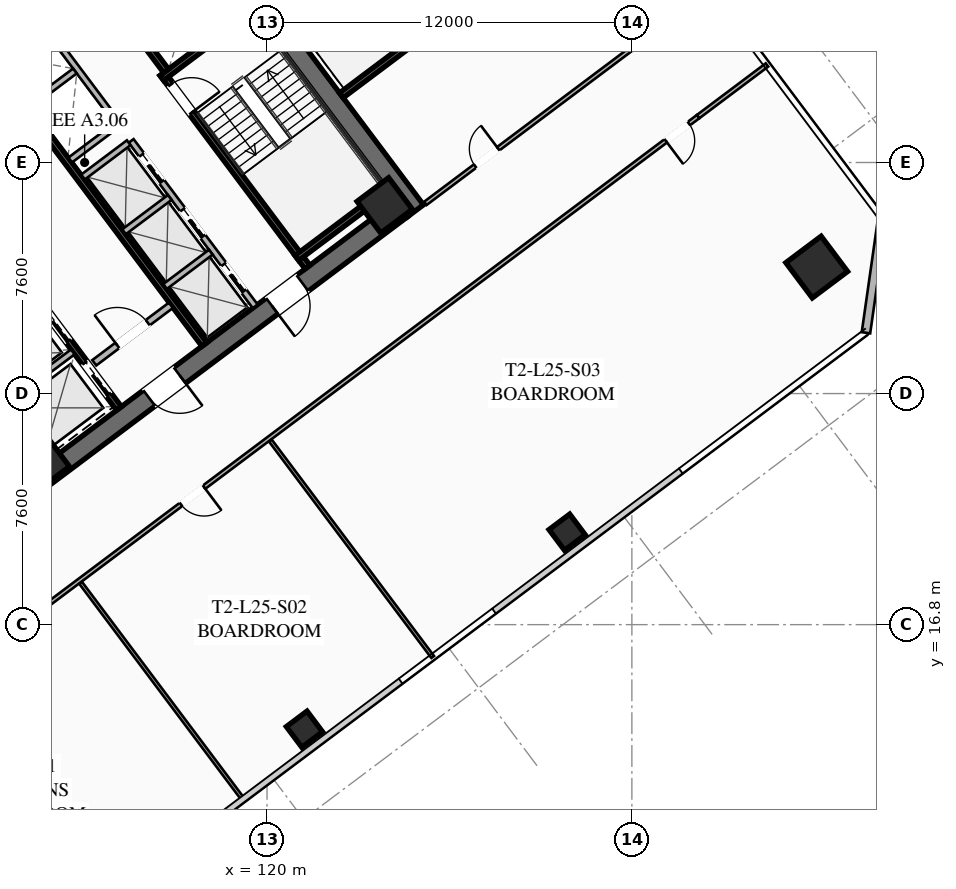
"""IFC4 building model, lengths in metres.
Left out: names, types, materials, properties, quantities, classifications, styles, units other than length and angle.
Written with IfcOpenShell. Run it as: python <this file> out.ifc"""

import sys

from ifc_helpers import new_model, si_unit, direction, frame, frame_2d, origin, origin_2d, place, context, subcontext, project, spatial, rectangle, hollow_rectangle, extrude, element, fill, save


model = new_model("IFC4")
c1 = context("Model", 3, precision=1e-05, world=origin(), true_north=direction((0.0, 1.0)))
c2 = subcontext(c1, "Body", "Model", "MODEL_VIEW")
j1 = project(units=[si_unit("LENGTHUNIT", "METRE"), si_unit("PLANEANGLEUNIT", "RADIAN")], contexts=[c1])
p1 = place(None, origin())
s1 = spatial("IfcSite", under=j1, at=p1, CompositionType="ELEMENT")
p2 = place(p1, origin())
s2 = spatial("IfcBuilding", under=s1, at=p2, CompositionType="ELEMENT")
p3 = place(p2, frame((0.0, 0.0, 95.6)))
s3 = spatial("IfcBuildingStorey", under=s2, at=p3, CompositionType="ELEMENT", Elevation=95.6)
p4 = place(p3, frame((115.524, 42.893, 0.0), z_axis=(0.0, 0.0, 1.0), x_axis=(0.600005007985, -0.799996243986, 0.0)))
e1 = element("IfcWall", 1, at=p4, inside=s3, PredefinedType="SHEAR", context=c2, shape_type="SweptSolid", body=[
    extrude(rectangle(XDim=15.6, YDim=0.65, at=frame_2d((7.8, 0.0))), origin(), (0.0, 0.0, 1.0), 3.55),
])
p5 = place(p3, frame((124.429, 30.478, 0.0), z_axis=(0.0, 0.0, 1.0), x_axis=(-0.799998028465, -0.600002628705, 0.0)))
e2 = element("IfcWall", 2, at=p5, inside=s3, PredefinedType="SHEAR", context=c2, shape_type="SweptSolid", body=[
    extrude(rectangle(XDim=14.86, YDim=0.65, at=frame_2d((7.43, 0.0))), origin(), (0.0, 0.0, 1.0), 3.55),
])
p6 = place(p5, frame((9.13, 0.0, 0.0)))
e3 = element("IfcOpeningElement", 3, at=p6, cuts=e2, PredefinedType="OPENING", context=c2, shape_type="SweptSolid", body=[
    extrude(rectangle(XDim=1.25, YDim=2.25, at=frame_2d((0.625, 1.125))), frame((0.0, 0.335, 0.0), z_axis=(0.0, -1.0, 0.0), x_axis=(1.0, 0.0, 0.0)), (0.0, 0.0, 1.0), 0.67),
])
p7 = place(p5, frame((4.08, 0.0, 0.0)))
e4 = element("IfcOpeningElement", 4, at=p7, cuts=e2, PredefinedType="OPENING", context=c2, shape_type="SweptSolid", body=[
    extrude(rectangle(XDim=1.25, YDim=2.25, at=frame_2d((0.625, 1.125))), frame((0.0, 0.335, 0.0), z_axis=(0.0, -1.0, 0.0), x_axis=(1.0, 0.0, 0.0)), (0.0, 0.0, 1.0), 0.67),
])
p8 = place(p3, frame((103.571, 33.522, 0.0), z_axis=(0.0, 0.0, 1.0), x_axis=(0.799998028465, 0.600002628705, 0.0)))
e5 = element("IfcWall", 5, at=p8, inside=s3, PredefinedType="SHEAR", context=c2, shape_type="SweptSolid", body=[
    extrude(rectangle(XDim=14.86, YDim=0.65, at=frame_2d((7.43, 0.0))), origin(), (0.0, 0.0, 1.0), 3.55),
])
p9 = place(p8, frame((4.48, 0.0, 0.0)))
e6 = element("IfcOpeningElement", 6, at=p9, cuts=e5, PredefinedType="OPENING", context=c2, shape_type="SweptSolid", body=[
    extrude(rectangle(XDim=1.25, YDim=2.25, at=frame_2d((0.625, 1.125))), frame((0.0, 0.335, 0.0), z_axis=(0.0, -1.0, 0.0), x_axis=(1.0, 0.0, 0.0)), (0.0, 0.0, 1.0), 0.67),
])
p10 = place(p8, frame((9.53, 0.0, 0.0)))
e7 = element("IfcOpeningElement", 7, at=p10, cuts=e5, PredefinedType="OPENING", context=c2, shape_type="SweptSolid", body=[
    extrude(rectangle(XDim=1.25, YDim=2.25, at=frame_2d((0.625, 1.125))), frame((0.0, 0.335, 0.0), z_axis=(0.0, -1.0, 0.0), x_axis=(1.0, 0.0, 0.0)), (0.0, 0.0, 1.0), 0.67),
])
for number, where, z_axis, x_axis in (
    (8, (112.59, 22.13, 0.0), (0.0, 0.0, 1.0), (0.8, 0.6, 0.0)),
    (9, (123.87, 30.59, 0.0), (0.0, 0.0, 1.0), (0.8, 0.6, 0.0)),
):
    element("IfcColumn", number, at=place(p3, frame(where, z_axis=z_axis, x_axis=x_axis)), inside=s3, PredefinedType="COLUMN", context=c2, shape_type="SweptSolid", body=[
        extrude(hollow_rectangle(XDim=1.3, YDim=1.3, WallThickness=0.05, at=origin_2d()), origin(), (0.0, 0.0, 1.0), 3.35),
    ])
p11 = place(p3, frame((138.08, 28.56, 0.0), z_axis=(0.0, 0.0, 1.0), x_axis=(0.799999996291, 0.600000004945, 0.0)))
e10 = element("IfcColumn", 10, at=p11, inside=s3, PredefinedType="COLUMN", context=c2, shape_type="SweptSolid", body=[
    extrude(hollow_rectangle(XDim=1.45, YDim=1.45, WallThickness=0.055, at=origin_2d()), origin(), (0.0, 0.0, 1.0), 3.35),
])
for number, where, z_axis, x_axis in (
    (11, (121.23, 13.36, 0.0), (0.0, 0.0, 1.0), (0.8, 0.6, 0.0)),
    (12, (129.87, 19.84, 0.0), (0.0, 0.0, 1.0), (0.8, 0.6, 0.0)),
):
    element("IfcColumn", number, at=place(p3, frame(where, z_axis=z_axis, x_axis=x_axis)), inside=s3, PredefinedType="COLUMN", context=c2, shape_type="SweptSolid", body=[
        extrude(hollow_rectangle(XDim=0.85, YDim=0.85, WallThickness=0.035, at=origin_2d()), origin(), (0.0, 0.0, 1.0), 3.35),
    ])
p12 = place(p3, frame((140.24, 30.18, 0.0), z_axis=(0.0, 0.0, 1.0), x_axis=(-0.141430307517, -0.989948214866, 0.0)))
e13 = element("IfcWall", 13, at=p12, inside=s3, PredefinedType="SOLIDWALL", context=c2, shape_type="SweptSolid", body=[
    extrude(rectangle(XDim=3.818, YDim=0.28, at=frame_2d((1.909, 0.0))), origin(), (0.0, 0.0, 1.0), 3.35),
])
p13 = place(p3, frame((116.56, 34.92, 0.0), z_axis=(0.0, 0.0, 1.0), x_axis=(0.600009827119, -0.799992629566, 0.0)))
e14 = element("IfcWall", 14, at=p13, inside=s3, PredefinedType="SHEAR", context=c2, shape_type="SweptSolid", body=[
    extrude(rectangle(XDim=7.95, YDim=0.2, at=frame_2d((3.975, 0.0))), origin(), (0.0, 0.0, 1.0), 3.35),
])
p14 = place(p13, frame((0.45, 0.0, 0.0)))
e15 = element("IfcOpeningElement", 15, at=p14, cuts=e14, PredefinedType="OPENING", context=c2, shape_type="SweptSolid", body=[
    extrude(rectangle(XDim=1.15, YDim=2.2, at=frame_2d((0.575, 1.1))), frame((0.0, 0.11, 0.0), z_axis=(0.0, -1.0, 0.0), x_axis=(1.0, 0.0, 0.0)), (0.0, 0.0, 1.0), 0.22),
])
for number, where, z_axis, x_axis in (
    (16, (116.54, 34.78, 0.0), (0.0, 0.0, 1.0), (0.8, 0.6, 0.0)),
    (17, (120.98, 28.86, 0.0), (0.0, 0.0, 1.0), (0.8, 0.6, 0.0)),
):
    element("IfcWall", number, at=place(p3, frame(where, z_axis=z_axis, x_axis=x_axis)), inside=s3, PredefinedType="SHEAR", context=c2, shape_type="SweptSolid", body=[
        extrude(rectangle(XDim=3.73, YDim=0.2, at=frame_2d((1.865, 0.0))), origin(), (0.0, 0.0, 1.0), 3.35),
    ])
p15 = place(p3, frame((117.938, 26.016, 0.0), z_axis=(0.0, 0.0, 1.0), x_axis=(-0.600005463273, 0.799995902516, 0.0)))
e18 = element("IfcWall", 18, at=p15, inside=s3, PredefinedType="SHEAR", context=c2, shape_type="SweptSolid", body=[
    extrude(rectangle(XDim=14.3, YDim=0.2, at=frame_2d((7.15, 0.0))), origin(), (0.0, 0.0, 1.0), 3.35),
])
p16 = place(p3, frame((114.316, 25.412, 0.0), z_axis=(0.0, 0.0, 1.0), x_axis=(0.800018601094, 0.59997519774, 0.0)))
e19 = element("IfcWall", 19, at=p16, inside=s3, PredefinedType="SOLIDWALL", context=c2, shape_type="SweptSolid", body=[
    extrude(rectangle(XDim=3.15, YDim=0.22, at=frame_2d((1.575, 0.0))), origin(), (0.0, 0.0, 1.0), 2.703),
])
p17 = place(p16, frame((0.95, 0.0, 0.0)))
e20 = element("IfcOpeningElement", 20, at=p17, cuts=e19, PredefinedType="OPENING", context=c2, shape_type="SweptSolid", body=[
    extrude(rectangle(XDim=1.25, YDim=2.25, at=frame_2d((0.625, 1.125))), frame((0.0, 0.12, 0.0), z_axis=(0.0, -1.0, 0.0), x_axis=(1.0, 0.0, 0.0)), (0.0, 0.0, 1.0), 0.24),
])
p18 = place(p3, frame((115.13, 23.91, 0.0), z_axis=(0.0, 0.0, 1.0), x_axis=(-0.599975393228, 0.800018454488, 0.0)))
e21 = element("IfcWall", 21, at=p18, inside=s3, PredefinedType="SHEAR", context=c2, shape_type="SweptSolid", body=[
    extrude(rectangle(XDim=6.35, YDim=0.2, at=frame_2d((3.175, 0.0))), origin(), (0.0, 0.0, 1.0), 3.35),
])
p19 = place(p18, frame((4.775, 0.0, 0.0)))
e22 = element("IfcOpeningElement", 22, at=p19, cuts=e21, PredefinedType="OPENING", context=c2, shape_type="SweptSolid", body=[
    extrude(rectangle(XDim=1.3, YDim=2.25, at=frame_2d((0.65, 1.125))), frame((0.0, 0.11, 0.0), z_axis=(0.0, -1.0, 0.0), x_axis=(1.0, 0.0, 0.0)), (0.0, 0.0, 1.0), 0.22),
])
p20 = place(p18, frame((2.775, 0.0, 0.0)))
e23 = element("IfcOpeningElement", 23, at=p20, cuts=e21, PredefinedType="OPENING", context=c2, shape_type="SweptSolid", body=[
    extrude(rectangle(XDim=1.3, YDim=2.25, at=frame_2d((0.65, 1.125))), frame((0.0, 0.11, 0.0), z_axis=(0.0, -1.0, 0.0), x_axis=(1.0, 0.0, 0.0)), (0.0, 0.0, 1.0), 0.22),
])
p21 = place(p18, frame((0.575, 0.0, 0.0)))
e24 = element("IfcOpeningElement", 24, at=p21, cuts=e21, PredefinedType="OPENING", context=c2, shape_type="SweptSolid", body=[
    extrude(rectangle(XDim=1.3, YDim=2.25, at=frame_2d((0.65, 1.125))), frame((0.0, 0.11, 0.0), z_axis=(0.0, -1.0, 0.0), x_axis=(1.0, 0.0, 0.0)), (0.0, 0.0, 1.0), 0.22),
])
p22 = place(p3, frame((110.906, 23.742, 0.0), z_axis=(0.0, 0.0, 1.0), x_axis=(0.8, 0.6, 0.0)))
e25 = element("IfcWall", 25, at=p22, inside=s3, PredefinedType="SOLIDWALL", context=c2, shape_type="SweptSolid", body=[
    extrude(rectangle(XDim=3.38, YDim=0.2, at=frame_2d((1.69, 0.0))), origin(), (0.0, 0.0, 1.0), 3.35),
])
p23 = place(p3, frame((112.87, 40.09, 0.0), z_axis=(0.0, 0.0, 1.0), x_axis=(0.599975393228, -0.800018454488, 0.0)))
e26 = element("IfcWall", 26, at=p23, inside=s3, PredefinedType="SHEAR", context=c2, shape_type="SweptSolid", body=[
    extrude(rectangle(XDim=6.35, YDim=0.2, at=frame_2d((3.175, 0.0))), origin(), (0.0, 0.0, 1.0), 3.35),
])
p24 = place(p3, frame((119.61, 27.27, 0.0), z_axis=(0.0, 0.0, 1.0), x_axis=(-0.600011488909, 0.79999138319, 0.0)))
e27 = element("IfcWall", 27, at=p24, inside=s3, PredefinedType="SOLIDWALL", context=c2, shape_type="SweptSolid", body=[
    extrude(rectangle(XDim=6.8, YDim=0.2, at=frame_2d((3.4, 0.0))), origin(), (0.0, 0.0, 1.0), 3.35),
])
p25 = place(p24, frame((0.625, 0.0, 0.0)))
e28 = element("IfcOpeningElement", 28, at=p25, cuts=e27, PredefinedType="OPENING", context=c2, shape_type="SweptSolid", body=[
    extrude(rectangle(XDim=1.1, YDim=2.2, at=frame_2d((0.55, 1.1))), frame((0.0, 0.11, 0.0), z_axis=(0.0, -1.0, 0.0), x_axis=(1.0, 0.0, 0.0)), (0.0, 0.0, 1.0), 0.22),
])
p26 = place(p24, frame((2.875, 0.0, 0.0)))
e29 = element("IfcOpeningElement", 29, at=p26, cuts=e27, PredefinedType="OPENING", context=c2, shape_type="SweptSolid", body=[
    extrude(rectangle(XDim=1.1, YDim=2.2, at=frame_2d((0.55, 1.1))), frame((0.0, 0.11, 0.0), z_axis=(0.0, -1.0, 0.0), x_axis=(1.0, 0.0, 0.0)), (0.0, 0.0, 1.0), 0.22),
])
p27 = place(p24, frame((5.125, 0.0, 0.0)))
e30 = element("IfcOpeningElement", 30, at=p27, cuts=e27, PredefinedType="OPENING", context=c2, shape_type="SweptSolid", body=[
    extrude(rectangle(XDim=1.1, YDim=2.2, at=frame_2d((0.55, 1.1))), frame((0.0, 0.11, 0.0), z_axis=(0.0, -1.0, 0.0), x_axis=(1.0, 0.0, 0.0)), (0.0, 0.0, 1.0), 0.22),
])
p28 = place(p3, frame((116.646, 27.922, 0.0), z_axis=(0.0, 0.0, 1.0), x_axis=(0.8, 0.6, 0.0)))
e31 = element("IfcWall", 31, at=p28, inside=s3, PredefinedType="SOLIDWALL", context=c2, shape_type="SweptSolid", body=[
    extrude(rectangle(XDim=1.88, YDim=0.2, at=frame_2d((0.94, 0.0))), origin(), (0.0, 0.0, 1.0), 3.35),
])
p29 = place(p3, frame((115.296, 29.722, 0.0), z_axis=(0.0, 0.0, 1.0), x_axis=(0.799984418148, 0.600020775241, 0.0)))
e32 = element("IfcWall", 32, at=p29, inside=s3, PredefinedType="SOLIDWALL", context=c2, shape_type="SweptSolid", body=[
    extrude(rectangle(XDim=1.88, YDim=0.2, at=frame_2d((0.94, 0.0))), origin(), (0.0, 0.0, 1.0), 3.35),
])
p30 = place(p3, frame((113.946, 31.522, 0.0), z_axis=(0.0, 0.0, 1.0), x_axis=(0.8, 0.6, 0.0)))
e33 = element("IfcWall", 33, at=p30, inside=s3, PredefinedType="SOLIDWALL", context=c2, shape_type="SweptSolid", body=[
    extrude(rectangle(XDim=1.88, YDim=0.2, at=frame_2d((0.94, 0.0))), origin(), (0.0, 0.0, 1.0), 3.35),
])
p31 = place(p3, frame((115.11, 33.27, 0.0), z_axis=(0.0, 0.0, 1.0), x_axis=(-0.600011488909, 0.79999138319, 0.0)))
e34 = element("IfcWall", 34, at=p31, inside=s3, PredefinedType="SOLIDWALL", context=c2, shape_type="SweptSolid", body=[
    extrude(rectangle(XDim=6.8, YDim=0.2, at=frame_2d((3.4, 0.0))), origin(), (0.0, 0.0, 1.0), 3.35),
])
p32 = place(p3, frame((113.526, 32.082, 0.0), z_axis=(0.0, 0.0, 1.0), x_axis=(0.800046745961, 0.599937666993, 0.0)))
e35 = element("IfcWall", 35, at=p32, inside=s3, PredefinedType="SOLIDWALL", context=c2, shape_type="SweptSolid", body=[
    extrude(rectangle(XDim=1.88, YDim=0.2, at=frame_2d((0.94, 0.0))), origin(), (0.0, 0.0, 1.0), 3.35),
])
p33 = place(p3, frame((112.176, 33.882, 0.0), z_axis=(0.0, 0.0, 1.0), x_axis=(0.8, 0.6, 0.0)))
e36 = element("IfcWall", 36, at=p33, inside=s3, PredefinedType="SOLIDWALL", context=c2, shape_type="SweptSolid", body=[
    extrude(rectangle(XDim=1.88, YDim=0.2, at=frame_2d((0.94, 0.0))), origin(), (0.0, 0.0, 1.0), 3.35),
])
p34 = place(p3, frame((122.444, 34.208, 0.0), z_axis=(0.0, 0.0, 1.0), x_axis=(0.79999138319, 0.600011488909, 0.0)))
e37 = element("IfcWall", 37, at=p34, inside=s3, PredefinedType="SHEAR", context=c2, shape_type="SweptSolid", body=[
    extrude(rectangle(XDim=3.4, YDim=0.2, at=frame_2d((1.7, 0.0))), origin(), (0.0, 0.0, 1.0), 3.35),
])
p35 = place(p3, frame((98.276, 34.332, 0.0), z_axis=(0.0, 0.0, 1.0), x_axis=(0.800003113347, 0.599995848849, 0.0)))
e38 = element("IfcWall", 38, at=p35, inside=s3, PredefinedType="PARTITIONING", context=c2, shape_type="SweptSolid", body=[
    extrude(rectangle(XDim=28.23, YDim=0.135, at=frame_2d((14.115, 0.0))), origin(), (0.0, 0.0, 1.0), 2.703),
])
p36 = place(p35, frame((0.3, 0.0, 0.0)))
e39 = element("IfcOpeningElement", 39, at=p36, cuts=e38, PredefinedType="OPENING", context=c2, shape_type="SweptSolid", body=[
    extrude(rectangle(XDim=0.95, YDim=2.05, at=frame_2d((0.475, 1.025))), frame((0.0, 0.077, 0.0), z_axis=(0.0, -1.0, 0.0), x_axis=(1.0, 0.0, 0.0)), (0.0, 0.0, 1.0), 0.155),
])
p37 = place(p35, frame((11.023, 0.0, 0.0)))
e40 = element("IfcOpeningElement", 40, at=p37, cuts=e38, PredefinedType="OPENING", context=c2, shape_type="SweptSolid", body=[
    extrude(rectangle(XDim=0.95, YDim=2.05, at=frame_2d((0.475, 1.025))), frame((0.0, 0.077, 0.0), z_axis=(0.0, -1.0, 0.0), x_axis=(1.0, 0.0, 0.0)), (0.0, 0.0, 1.0), 0.155),
])
p38 = place(p35, frame((26.98, 0.0, 0.0)))
e41 = element("IfcOpeningElement", 41, at=p38, cuts=e38, PredefinedType="OPENING", context=c2, shape_type="SweptSolid", body=[
    extrude(rectangle(XDim=0.95, YDim=2.05, at=frame_2d((0.475, 1.025))), frame((0.0, 0.077, 0.0), z_axis=(0.0, -1.0, 0.0), x_axis=(1.0, 0.0, 0.0)), (0.0, 0.0, 1.0), 0.155),
])
p39 = place(p3, frame((134.18, 33.51, 0.0), z_axis=(0.0, 0.0, 1.0), x_axis=(-0.8, -0.6, 0.0)))
e42 = element("IfcWall", 42, at=p39, inside=s3, PredefinedType="PARTITIONING", context=c2, shape_type="SweptSolid", body=[
    extrude(rectangle(XDim=28.23, YDim=0.135, at=frame_2d((14.115, 0.0))), origin(), (0.0, 0.0, 1.0), 2.703),
])
p40 = place(p39, frame((26.9, 0.0, 0.0)))
e43 = element("IfcOpeningElement", 43, at=p40, cuts=e42, PredefinedType="OPENING", context=c2, shape_type="SweptSolid", body=[
    extrude(rectangle(XDim=0.95, YDim=2.05, at=frame_2d((0.475, 1.025))), frame((0.0, 0.077, 0.0), z_axis=(0.0, -1.0, 0.0), x_axis=(1.0, 0.0, 0.0)), (0.0, 0.0, 1.0), 0.155),
])
p41 = place(p39, frame((20.314, 0.0, 0.0)))
e44 = element("IfcOpeningElement", 44, at=p41, cuts=e42, PredefinedType="OPENING", context=c2, shape_type="SweptSolid", body=[
    extrude(rectangle(XDim=0.95, YDim=2.05, at=frame_2d((0.475, 1.025))), frame((0.0, 0.077, 0.0), z_axis=(0.0, -1.0, 0.0), x_axis=(1.0, 0.0, 0.0)), (0.0, 0.0, 1.0), 0.155),
])
p42 = place(p39, frame((0.38, 0.0, 0.0)))
e45 = element("IfcOpeningElement", 45, at=p42, cuts=e42, PredefinedType="OPENING", context=c2, shape_type="SweptSolid", body=[
    extrude(rectangle(XDim=0.95, YDim=2.05, at=frame_2d((0.475, 1.025))), frame((0.0, 0.077, 0.0), z_axis=(0.0, -1.0, 0.0), x_axis=(1.0, 0.0, 0.0)), (0.0, 0.0, 1.0), 0.155),
])
p43 = place(p3, frame((134.18, 33.51, 0.0), z_axis=(0.0, 0.0, 1.0), x_axis=(0.8000207031, 0.599972394874, 0.0)))
e46 = element("IfcWall", 46, at=p43, inside=s3, PredefinedType="PARTITIONING", context=c2, shape_type="SweptSolid", body=[
    extrude(rectangle(XDim=2.83, YDim=0.135, at=frame_2d((1.415, 0.0))), origin(), (0.0, 0.0, 1.0), 2.703),
])
p44 = place(p3, frame((119.208, 11.056, 0.0), z_axis=(0.0, 0.0, 1.0), x_axis=(-0.6, 0.8, 0.0)))
e47 = element("IfcWall", 47, at=p44, inside=s3, PredefinedType="PARTITIONING", context=c2, shape_type="SweptSolid", body=[
    extrude(rectangle(XDim=8.9, YDim=0.11, at=frame_2d((4.45, 0.0))), origin(), (0.0, 0.0, 1.0), 2.703),
])
p45 = place(p3, frame((125.448, 15.736, 0.0), z_axis=(0.0, 0.0, 1.0), x_axis=(-0.600013167126, 0.799990124486, 0.0)))
e48 = element("IfcWall", 48, at=p45, inside=s3, PredefinedType="PARTITIONING", context=c2, shape_type="SweptSolid", body=[
    extrude(rectangle(XDim=8.9, YDim=0.11, at=frame_2d((4.45, 0.0))), origin(), (0.0, 0.0, 1.0), 2.703),
])
p46 = place(p3, frame((125.208, 30.656, 0.0), z_axis=(0.0, 0.0, 1.0), x_axis=(0.8, 0.6, 0.0)))
e49 = element("IfcWall", 49, at=p46, inside=s3, PredefinedType="PARTITIONING", context=c2, shape_type="SweptSolid", body=[
    extrude(rectangle(XDim=11.72, YDim=0.135, at=frame_2d((5.86, 0.0))), origin(), (0.0, 0.0, 1.0), 2.703),
])
p47 = place(p46, frame((2.045, 0.0, 0.0)))
e50 = element("IfcOpeningElement", 50, at=p47, cuts=e49, PredefinedType="OPENING", context=c2, shape_type="SweptSolid", body=[
    extrude(rectangle(XDim=0.95, YDim=2.05, at=frame_2d((0.475, 1.025))), frame((0.0, 0.077, 0.0), z_axis=(0.0, -1.0, 0.0), x_axis=(1.0, 0.0, 0.0)), (0.0, 0.0, 1.0), 0.155),
])
p48 = place(p6, origin())
e51 = element("IfcDoor", 51, at=p48, inside=s3, OperationType="SINGLE_SWING_LEFT", PredefinedType="DOOR", context=c2, shape_type="SweptSolid", body=[
    extrude(rectangle(XDim=1.25, YDim=2.25, at=frame_2d((0.625, 1.125))), frame((0.0, 0.025, 0.0), z_axis=(0.0, -1.0, 0.0), x_axis=(1.0, 0.0, 0.0)), (0.0, 0.0, 1.0), 0.05),
])
fill(e3, e51)
p49 = place(p7, origin())
e52 = element("IfcDoor", 52, at=p49, inside=s3, OperationType="SINGLE_SWING_RIGHT", PredefinedType="DOOR", context=c2, shape_type="SweptSolid", body=[
    extrude(rectangle(XDim=1.25, YDim=2.25, at=frame_2d((0.625, 1.125))), frame((0.0, 0.025, 0.0), z_axis=(0.0, -1.0, 0.0), x_axis=(1.0, 0.0, 0.0)), (0.0, 0.0, 1.0), 0.05),
])
fill(e4, e52)
p50 = place(p14, origin())
e53 = element("IfcDoor", 53, at=p50, inside=s3, OperationType="SINGLE_SWING_RIGHT", PredefinedType="DOOR", context=c2, shape_type="SweptSolid", body=[
    extrude(rectangle(XDim=1.15, YDim=2.2, at=frame_2d((0.575, 1.1))), frame((0.0, 0.025, 0.0), z_axis=(0.0, -1.0, 0.0), x_axis=(1.0, 0.0, 0.0)), (0.0, 0.0, 1.0), 0.05),
])
fill(e15, e53)
p51 = place(p17, origin())
e54 = element("IfcDoor", 54, at=p51, inside=s3, OperationType="SINGLE_SWING_LEFT", PredefinedType="DOOR", context=c2, shape_type="SweptSolid", body=[
    extrude(rectangle(XDim=1.25, YDim=2.25, at=frame_2d((0.625, 1.125))), frame((0.0, 0.025, 0.0), z_axis=(0.0, -1.0, 0.0), x_axis=(1.0, 0.0, 0.0)), (0.0, 0.0, 1.0), 0.05),
])
fill(e20, e54)
p52 = place(p41, origin())
e55 = element("IfcDoor", 55, at=p52, inside=s3, OperationType="SINGLE_SWING_LEFT", PredefinedType="DOOR", context=c2, shape_type="SweptSolid", body=[
    extrude(rectangle(XDim=0.95, YDim=2.05, at=frame_2d((0.475, 1.025))), frame((0.0, 0.025, 0.0), z_axis=(0.0, -1.0, 0.0), x_axis=(1.0, 0.0, 0.0)), (0.0, 0.0, 1.0), 0.05),
])
fill(e44, e55)
p53 = place(p42, origin())
e56 = element("IfcDoor", 56, at=p53, inside=s3, OperationType="SINGLE_SWING_RIGHT", PredefinedType="DOOR", context=c2, shape_type="SweptSolid", body=[
    extrude(rectangle(XDim=0.95, YDim=2.05, at=frame_2d((0.475, 1.025))), frame((0.0, 0.025, 0.0), z_axis=(0.0, -1.0, 0.0), x_axis=(1.0, 0.0, 0.0)), (0.0, 0.0, 1.0), 0.05),
])
fill(e45, e56)
p54 = place(p47, origin())
e57 = element("IfcDoor", 57, at=p54, inside=s3, OperationType="SINGLE_SWING_RIGHT", PredefinedType="DOOR", context=c2, shape_type="SweptSolid", body=[
    extrude(rectangle(XDim=0.95, YDim=2.05, at=frame_2d((0.475, 1.025))), frame((0.0, 0.025, 0.0), z_axis=(0.0, -1.0, 0.0), x_axis=(1.0, 0.0, 0.0)), (0.0, 0.0, 1.0), 0.05),
])
fill(e50, e57)
p55 = place(p20, origin())
e58 = element("IfcDoor", 58, at=p55, inside=s3, OperationType="SLIDING_TO_LEFT", PredefinedType="DOOR", context=c2, shape_type="SweptSolid", body=[
    extrude(rectangle(XDim=1.3, YDim=2.25, at=frame_2d((0.65, 1.125))), frame((0.0, 0.025, 0.0), z_axis=(0.0, -1.0, 0.0), x_axis=(1.0, 0.0, 0.0)), (0.0, 0.0, 1.0), 0.05),
])
fill(e23, e58)
p56 = place(p21, origin())
e59 = element("IfcDoor", 59, at=p56, inside=s3, OperationType="SLIDING_TO_LEFT", PredefinedType="DOOR", context=c2, shape_type="SweptSolid", body=[
    extrude(rectangle(XDim=1.3, YDim=2.25, at=frame_2d((0.65, 1.125))), frame((0.0, 0.025, 0.0), z_axis=(0.0, -1.0, 0.0), x_axis=(1.0, 0.0, 0.0)), (0.0, 0.0, 1.0), 0.05),
])
fill(e24, e59)
p57 = place(p25, origin())
e60 = element("IfcDoor", 60, at=p57, inside=s3, OperationType="SLIDING_TO_LEFT", PredefinedType="DOOR", context=c2, shape_type="SweptSolid", body=[
    extrude(rectangle(XDim=1.1, YDim=2.2, at=frame_2d((0.55, 1.1))), frame((0.0, 0.025, 0.0), z_axis=(0.0, -1.0, 0.0), x_axis=(1.0, 0.0, 0.0)), (0.0, 0.0, 1.0), 0.05),
])
fill(e28, e60)
p58 = place(p26, origin())
e61 = element("IfcDoor", 61, at=p58, inside=s3, OperationType="SLIDING_TO_LEFT", PredefinedType="DOOR", context=c2, shape_type="SweptSolid", body=[
    extrude(rectangle(XDim=1.1, YDim=2.2, at=frame_2d((0.55, 1.1))), frame((0.0, 0.025, 0.0), z_axis=(0.0, -1.0, 0.0), x_axis=(1.0, 0.0, 0.0)), (0.0, 0.0, 1.0), 0.05),
])
fill(e29, e61)
p59 = place(p27, origin())
e62 = element("IfcDoor", 62, at=p59, inside=s3, OperationType="SLIDING_TO_LEFT", PredefinedType="DOOR", context=c2, shape_type="SweptSolid", body=[
    extrude(rectangle(XDim=1.1, YDim=2.2, at=frame_2d((0.55, 1.1))), frame((0.0, 0.025, 0.0), z_axis=(0.0, -1.0, 0.0), x_axis=(1.0, 0.0, 0.0)), (0.0, 0.0, 1.0), 0.05),
])
fill(e30, e62)
save(model, sys.argv[1])
